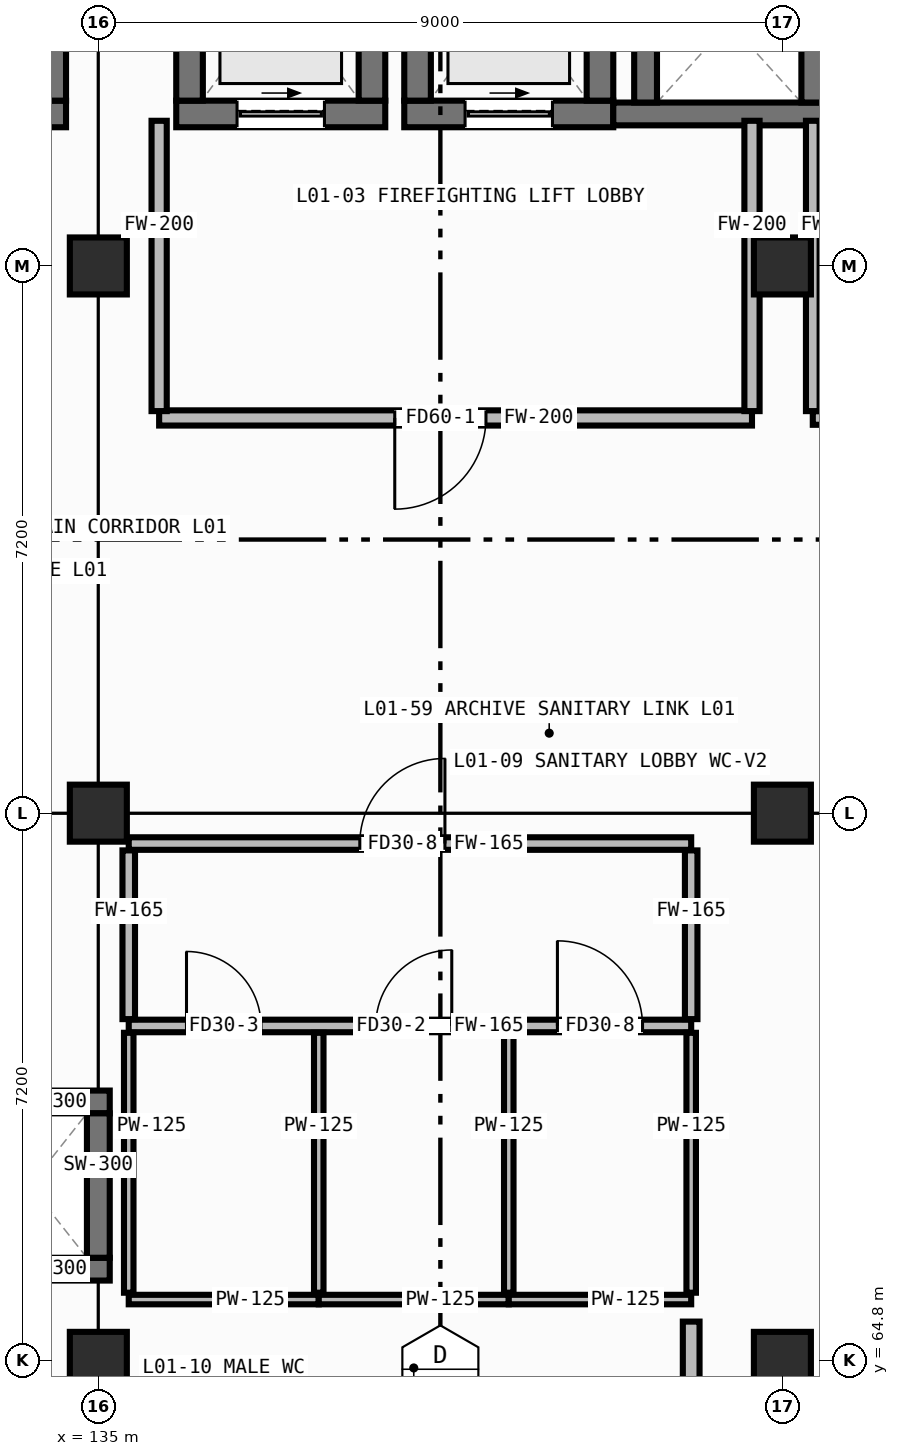
"""IFC4 building model, lengths in metres.
Left out: names, types, materials, properties, quantities, classifications, styles, units other than length and angle.
Written with IfcOpenShell. Run it as: python <this file> out.ifc"""

import sys

from ifc_helpers import new_model, si_unit, direction, frame, frame_2d, origin, origin_2d, place, context, subcontext, project, spatial, rectangle, hollow_rectangle, extrude, element, fill, save


model = new_model("IFC4")
c1 = context("Model", 3, precision=1e-05, world=origin(), true_north=direction((0.0, 1.0)))
c2 = subcontext(c1, "Body", "Model", "MODEL_VIEW")
j1 = project(units=[si_unit("LENGTHUNIT", "METRE"), si_unit("PLANEANGLEUNIT", "RADIAN")], contexts=[c1])
p1 = place(None, origin())
s1 = spatial("IfcSite", under=j1, at=p1, CompositionType="ELEMENT")
p2 = place(p1, origin())
s2 = spatial("IfcBuilding", under=s1, at=p2, CompositionType="ELEMENT")
p3 = place(p2, origin())
s3 = spatial("IfcBuildingStorey", under=s2, at=p3, CompositionType="ELEMENT", Elevation=0.0)
for number, where, z_axis, x_axis in (
    (1, (135.0, 64.8, 0.0), (0.0, 0.0, 1.0), (1.0, 0.0, 0.0)),
    (2, (135.0, 72.0, 0.0), (0.0, 0.0, 1.0), (1.0, 0.0, 0.0)),
    (3, (135.0, 79.2, 0.0), (0.0, 0.0, 1.0), (1.0, 0.0, 0.0)),
    (4, (144.0, 64.8, 0.0), (0.0, 0.0, 1.0), (1.0, 0.0, 0.0)),
    (5, (144.0, 72.0, 0.0), (0.0, 0.0, 1.0), (1.0, 0.0, 0.0)),
    (6, (144.0, 79.2, 0.0), (0.0, 0.0, 1.0), (1.0, 0.0, 0.0)),
):
    element("IfcColumn", number, at=place(p3, frame(where, z_axis=z_axis, x_axis=x_axis)), inside=s3, PredefinedType="COLUMN", context=c2, shape_type="SweptSolid", body=[
        extrude(hollow_rectangle(XDim=0.75, YDim=0.75, WallThickness=0.032, at=origin_2d()), origin(), (0.0, 0.0, 1.0), 4.8),
    ])
p4 = place(p3, frame((126.425, 81.2, 0.0), z_axis=(0.0, 0.0, 1.0), x_axis=(1.0, 0.0, 0.0)))
e7 = element("IfcWall", 7, at=p4, inside=s3, PredefinedType="SHEAR", context=c2, shape_type="SweptSolid", body=[
    extrude(rectangle(XDim=8.15, YDim=0.35, at=frame_2d((4.075, 0.0))), origin(), (0.0, 0.0, 1.0), 4.555),
])
p5 = place(p4, frame((0.525, 0.0, 0.0)))
e8 = element("IfcOpeningElement", 8, at=p5, cuts=e7, PredefinedType="OPENING", context=c2, shape_type="SweptSolid", body=[
    extrude(rectangle(XDim=1.15, YDim=2.1, at=frame_2d((0.575, 1.05))), frame((0.0, 0.187, 0.0), z_axis=(0.0, -1.0, 0.0), x_axis=(1.0, 0.0, 0.0)), (0.0, 0.0, 1.0), 0.374),
])
p6 = place(p3, frame((134.4, 81.375, 0.0), z_axis=(0.0, 0.0, 1.0), x_axis=(0.0, 1.0, 0.0)))
e9 = element("IfcWall", 9, at=p6, inside=s3, PredefinedType="SHEAR", context=c2, shape_type="SweptSolid", body=[
    extrude(rectangle(XDim=3.55, YDim=0.35, at=frame_2d((1.775, 0.0))), origin(), (0.0, 0.0, 1.0), 4.555),
])
p7 = place(p3, frame((136.025, 81.2, 0.0), z_axis=(0.0, 0.0, 1.0), x_axis=(1.0, 0.0, 0.0)))
e10 = element("IfcWall", 10, at=p7, inside=s3, PredefinedType="SHEAR", context=c2, shape_type="SweptSolid", body=[
    extrude(rectangle(XDim=2.75, YDim=0.35, at=frame_2d((1.375, 0.0))), origin(), (0.0, 0.0, 1.0), 4.555),
])
p8 = place(p7, frame((0.8, 0.0, 0.0)))
e11 = element("IfcOpeningElement", 11, at=p8, cuts=e10, PredefinedType="OPENING", context=c2, shape_type="SweptSolid", body=[
    extrude(rectangle(XDim=1.15, YDim=2.12, at=frame_2d((0.575, 1.06))), frame((0.0, 0.187, 0.0), z_axis=(0.0, -1.0, 0.0), x_axis=(1.0, 0.0, 0.0)), (0.0, 0.0, 1.0), 0.374),
])
for number, where, z_axis, x_axis in (
    (12, (136.2, 81.375, 0.0), (0.0, 0.0, 1.0), (0.0, 1.0, 0.0)),
    (13, (138.6, 81.375, 0.0), (0.0, 0.0, 1.0), (0.0, 1.0, 0.0)),
):
    element("IfcWall", number, at=place(p3, frame(where, z_axis=z_axis, x_axis=x_axis)), inside=s3, PredefinedType="SHEAR", context=c2, shape_type="SweptSolid", body=[
        extrude(rectangle(XDim=2.85, YDim=0.35, at=frame_2d((1.425, 0.0))), origin(), (0.0, 0.0, 1.0), 4.555),
    ])
p9 = place(p3, frame((139.025, 81.2, 0.0), z_axis=(0.0, 0.0, 1.0), x_axis=(1.0, 0.0, 0.0)))
e14 = element("IfcWall", 14, at=p9, inside=s3, PredefinedType="SHEAR", context=c2, shape_type="SweptSolid", body=[
    extrude(rectangle(XDim=2.75, YDim=0.35, at=frame_2d((1.375, 0.0))), origin(), (0.0, 0.0, 1.0), 4.555),
])
p10 = place(p9, frame((0.8, 0.0, 0.0)))
e15 = element("IfcOpeningElement", 15, at=p10, cuts=e14, PredefinedType="OPENING", context=c2, shape_type="SweptSolid", body=[
    extrude(rectangle(XDim=1.15, YDim=2.12, at=frame_2d((0.575, 1.06))), frame((0.0, 0.187, 0.0), z_axis=(0.0, -1.0, 0.0), x_axis=(1.0, 0.0, 0.0)), (0.0, 0.0, 1.0), 0.374),
])
for number, where, z_axis, x_axis in (
    (16, (139.2, 81.375, 0.0), (0.0, 0.0, 1.0), (0.0, 1.0, 0.0)),
    (17, (141.6, 81.375, 0.0), (0.0, 0.0, 1.0), (0.0, 1.0, 0.0)),
):
    element("IfcWall", number, at=place(p3, frame(where, z_axis=z_axis, x_axis=x_axis)), inside=s3, PredefinedType="SHEAR", context=c2, shape_type="SweptSolid", body=[
        extrude(rectangle(XDim=2.85, YDim=0.35, at=frame_2d((1.425, 0.0))), origin(), (0.0, 0.0, 1.0), 4.555),
    ])
p11 = place(p3, frame((141.775, 81.2, 0.0), z_axis=(0.0, 0.0, 1.0), x_axis=(1.0, 0.0, 0.0)))
e18 = element("IfcWall", 18, at=p11, inside=s3, PredefinedType="SHEAR", context=c2, shape_type="SweptSolid", body=[
    extrude(rectangle(XDim=3.25, YDim=0.3, at=frame_2d((1.625, 0.0))), origin(), (0.0, 0.0, 1.0), 4.555),
])
for number, where, z_axis, x_axis in (
    (19, (142.2, 81.35, 0.0), (0.0, 0.0, 1.0), (0.0, 1.0, 0.0)),
    (20, (144.4, 81.35, 0.0), (0.0, 0.0, 1.0), (0.0, 1.0, 0.0)),
    (21, (133.05, 66.0, 0.0), (0.0, 0.0, 1.0), (1.0, 0.0, 0.0)),
    (22, (133.05, 68.2, 0.0), (0.0, 0.0, 1.0), (1.0, 0.0, 0.0)),
):
    element("IfcWall", number, at=place(p3, frame(where, z_axis=z_axis, x_axis=x_axis)), inside=s3, PredefinedType="SHEAR", context=c2, shape_type="SweptSolid", body=[
        extrude(rectangle(XDim=2.1, YDim=0.3, at=frame_2d((1.05, 0.0))), origin(), (0.0, 0.0, 1.0), 4.555),
    ])
p12 = place(p3, frame((135.0, 66.15, 0.0), z_axis=(0.0, 0.0, 1.0), x_axis=(0.0, 1.0, 0.0)))
e23 = element("IfcWall", 23, at=p12, inside=s3, PredefinedType="SHEAR", context=c2, shape_type="SweptSolid", body=[
    extrude(rectangle(XDim=1.9, YDim=0.3, at=frame_2d((0.95, 0.0))), origin(), (0.0, 0.0, 1.0), 4.555),
])
p13 = place(p3, frame((135.8, 77.2, 0.0), z_axis=(0.0, 0.0, 1.0), x_axis=(1.0, 0.0, 0.0)))
e24 = element("IfcWall", 24, at=p13, inside=s3, PredefinedType="PARTITIONING", context=c2, shape_type="SweptSolid", body=[
    extrude(rectangle(XDim=7.8, YDim=0.2, at=frame_2d((3.9, 0.0))), origin(), (0.0, 0.0, 1.0), 4.555),
])
p14 = place(p13, frame((3.1, 0.0, 0.0)))
e25 = element("IfcOpeningElement", 25, at=p14, cuts=e24, PredefinedType="OPENING", context=c2, shape_type="SweptSolid", body=[
    extrude(rectangle(XDim=1.2, YDim=2.1, at=frame_2d((0.6, 1.05))), frame((0.0, 0.112, 0.0), z_axis=(0.0, -1.0, 0.0), x_axis=(1.0, 0.0, 0.0)), (0.0, 0.0, 1.0), 0.224),
])
for number, where, z_axis, x_axis in (
    (26, (135.8, 77.29, 0.0), (0.0, 0.0, 1.0), (0.0, 1.0, 0.0)),
    (27, (143.6, 77.29, 0.0), (0.0, 0.0, 1.0), (0.0, 1.0, 0.0)),
):
    element("IfcWall", number, at=place(p3, frame(where, z_axis=z_axis, x_axis=x_axis)), inside=s3, PredefinedType="PARTITIONING", context=c2, shape_type="SweptSolid", body=[
        extrude(rectangle(XDim=3.82, YDim=0.2, at=frame_2d((1.91, 0.0))), origin(), (0.0, 0.0, 1.0), 4.555),
    ])
p15 = place(p3, frame((144.4, 77.2, 0.0), z_axis=(0.0, 0.0, 1.0), x_axis=(1.0, 0.0, 0.0)))
e28 = element("IfcWall", 28, at=p15, inside=s3, PredefinedType="PARTITIONING", context=c2, shape_type="SweptSolid", body=[
    extrude(rectangle(XDim=8.2, YDim=0.18, at=frame_2d((4.1, 0.0))), origin(), (0.0, 0.0, 1.0), 4.555),
])
p16 = place(p15, frame((3.54, 0.0, 0.0)))
e29 = element("IfcOpeningElement", 29, at=p16, cuts=e28, PredefinedType="OPENING", context=c2, shape_type="SweptSolid", body=[
    extrude(rectangle(XDim=1.12, YDim=2.08, at=frame_2d((0.56, 1.04))), frame((0.0, 0.102, 0.0), z_axis=(0.0, -1.0, 0.0), x_axis=(1.0, 0.0, 0.0)), (0.0, 0.0, 1.0), 0.204),
])
p17 = place(p3, frame((144.4, 77.29, 0.0), z_axis=(0.0, 0.0, 1.0), x_axis=(0.0, 1.0, 0.0)))
e30 = element("IfcWall", 30, at=p17, inside=s3, PredefinedType="PARTITIONING", context=c2, shape_type="SweptSolid", body=[
    extrude(rectangle(XDim=3.82, YDim=0.18, at=frame_2d((1.91, 0.0))), origin(), (0.0, 0.0, 1.0), 4.555),
])
p18 = place(p3, frame((135.4, 69.2, 0.0), z_axis=(0.0, 0.0, 1.0), x_axis=(1.0, 0.0, 0.0)))
e31 = element("IfcWall", 31, at=p18, inside=s3, PredefinedType="PARTITIONING", context=c2, shape_type="SweptSolid", body=[
    extrude(rectangle(XDim=7.4, YDim=0.165, at=frame_2d((3.7, 0.0))), origin(), (0.0, 0.0, 1.0), 4.555),
])
p19 = place(p18, frame((0.76, 0.0, 0.0)))
e32 = element("IfcOpeningElement", 32, at=p19, cuts=e31, PredefinedType="OPENING", context=c2, shape_type="SweptSolid", body=[
    extrude(rectangle(XDim=0.98, YDim=2.02, at=frame_2d((0.49, 1.01))), frame((0.0, 0.094, 0.0), z_axis=(0.0, -1.0, 0.0), x_axis=(1.0, 0.0, 0.0)), (0.0, 0.0, 1.0), 0.189),
])
p20 = place(p18, frame((3.25, 0.0, 0.0)))
e33 = element("IfcOpeningElement", 33, at=p20, cuts=e31, PredefinedType="OPENING", context=c2, shape_type="SweptSolid", body=[
    extrude(rectangle(XDim=1.0, YDim=2.08, at=frame_2d((0.5, 1.04))), frame((0.0, 0.094, 0.0), z_axis=(0.0, -1.0, 0.0), x_axis=(1.0, 0.0, 0.0)), (0.0, 0.0, 1.0), 0.189),
])
p21 = place(p18, frame((5.64, 0.0, 0.0)))
e34 = element("IfcOpeningElement", 34, at=p21, cuts=e31, PredefinedType="OPENING", context=c2, shape_type="SweptSolid", body=[
    extrude(rectangle(XDim=1.12, YDim=2.08, at=frame_2d((0.56, 1.04))), frame((0.0, 0.094, 0.0), z_axis=(0.0, -1.0, 0.0), x_axis=(1.0, 0.0, 0.0)), (0.0, 0.0, 1.0), 0.189),
])
p22 = place(p3, frame((135.4, 71.6, 0.0), z_axis=(0.0, 0.0, 1.0), x_axis=(1.0, 0.0, 0.0)))
e35 = element("IfcWall", 35, at=p22, inside=s3, PredefinedType="PARTITIONING", context=c2, shape_type="SweptSolid", body=[
    extrude(rectangle(XDim=7.4, YDim=0.165, at=frame_2d((3.7, 0.0))), origin(), (0.0, 0.0, 1.0), 4.555),
])
p23 = place(p22, frame((3.04, 0.0, 0.0)))
e36 = element("IfcOpeningElement", 36, at=p23, cuts=e35, PredefinedType="OPENING", context=c2, shape_type="SweptSolid", body=[
    extrude(rectangle(XDim=1.12, YDim=2.08, at=frame_2d((0.56, 1.04))), frame((0.0, 0.094, 0.0), z_axis=(0.0, -1.0, 0.0), x_axis=(1.0, 0.0, 0.0)), (0.0, 0.0, 1.0), 0.189),
])
for number, where, z_axis, x_axis in (
    (37, (135.4, 69.29, 0.0), (0.0, 0.0, 1.0), (0.0, 1.0, 0.0)),
    (38, (142.8, 69.29, 0.0), (0.0, 0.0, 1.0), (0.0, 1.0, 0.0)),
):
    element("IfcWall", number, at=place(p3, frame(where, z_axis=z_axis, x_axis=x_axis)), inside=s3, PredefinedType="PARTITIONING", context=c2, shape_type="SweptSolid", body=[
        extrude(rectangle(XDim=2.22, YDim=0.165, at=frame_2d((1.11, 0.0))), origin(), (0.0, 0.0, 1.0), 4.555),
    ])
p24 = place(p3, frame((135.4, 65.6, 0.0), z_axis=(0.0, 0.0, 1.0), x_axis=(1.0, 0.0, 0.0)))
e39 = element("IfcWall", 39, at=p24, inside=s3, PredefinedType="PARTITIONING", context=c2, shape_type="SweptSolid", body=[
    extrude(rectangle(XDim=2.5, YDim=0.125, at=frame_2d((1.25, 0.0))), origin(), (0.0, 0.0, 1.0), 4.555),
])
for number, where, z_axis, x_axis in (
    (40, (135.4, 65.69, 0.0), (0.0, 0.0, 1.0), (0.0, 1.0, 0.0)),
    (41, (137.9, 65.69, 0.0), (0.0, 0.0, 1.0), (0.0, 1.0, 0.0)),
):
    element("IfcWall", number, at=place(p3, frame(where, z_axis=z_axis, x_axis=x_axis)), inside=s3, PredefinedType="PARTITIONING", context=c2, shape_type="SweptSolid", body=[
        extrude(rectangle(XDim=3.42, YDim=0.125, at=frame_2d((1.71, 0.0))), origin(), (0.0, 0.0, 1.0), 4.555),
    ])
p25 = place(p3, frame((137.9, 65.6, 0.0), z_axis=(0.0, 0.0, 1.0), x_axis=(1.0, 0.0, 0.0)))
e42 = element("IfcWall", 42, at=p25, inside=s3, PredefinedType="PARTITIONING", context=c2, shape_type="SweptSolid", body=[
    extrude(rectangle(XDim=2.5, YDim=0.125, at=frame_2d((1.25, 0.0))), origin(), (0.0, 0.0, 1.0), 4.555),
])
p26 = place(p3, frame((140.4, 65.69, 0.0), z_axis=(0.0, 0.0, 1.0), x_axis=(0.0, 1.0, 0.0)))
e43 = element("IfcWall", 43, at=p26, inside=s3, PredefinedType="PARTITIONING", context=c2, shape_type="SweptSolid", body=[
    extrude(rectangle(XDim=3.42, YDim=0.125, at=frame_2d((1.71, 0.0))), origin(), (0.0, 0.0, 1.0), 4.555),
])
p27 = place(p3, frame((140.4, 65.6, 0.0), z_axis=(0.0, 0.0, 1.0), x_axis=(1.0, 0.0, 0.0)))
e44 = element("IfcWall", 44, at=p27, inside=s3, PredefinedType="PARTITIONING", context=c2, shape_type="SweptSolid", body=[
    extrude(rectangle(XDim=2.4, YDim=0.125, at=frame_2d((1.2, 0.0))), origin(), (0.0, 0.0, 1.0), 4.555),
])
p28 = place(p3, frame((142.8, 65.69, 0.0), z_axis=(0.0, 0.0, 1.0), x_axis=(0.0, 1.0, 0.0)))
e45 = element("IfcWall", 45, at=p28, inside=s3, PredefinedType="PARTITIONING", context=c2, shape_type="SweptSolid", body=[
    extrude(rectangle(XDim=3.42, YDim=0.125, at=frame_2d((1.71, 0.0))), origin(), (0.0, 0.0, 1.0), 4.555),
])
p29 = place(p3, frame((142.8, 43.38, 0.0), z_axis=(0.0, 0.0, 1.0), x_axis=(0.0, 1.0, 0.0)))
e46 = element("IfcWall", 46, at=p29, inside=s3, PredefinedType="PARTITIONING", context=c2, shape_type="SweptSolid", body=[
    extrude(rectangle(XDim=21.93, YDim=0.22, at=frame_2d((10.965, 0.0))), origin(), (0.0, 0.0, 1.0), 4.555),
])
p30 = place(p29, frame((9.945, 0.0, 0.0)))
e47 = element("IfcOpeningElement", 47, at=p30, cuts=e46, PredefinedType="OPENING", context=c2, shape_type="SweptSolid", body=[
    extrude(rectangle(XDim=1.35, YDim=2.08, at=frame_2d((0.675, 1.04))), frame((0.0, 0.122, 0.0), z_axis=(0.0, -1.0, 0.0), x_axis=(1.0, 0.0, 0.0)), (0.0, 0.0, 1.0), 0.244),
])
p31 = place(p8, origin())
e48 = element("IfcDoor", 48, at=p31, inside=s3, OperationType="SLIDING_TO_LEFT", PredefinedType="DOOR", context=c2, shape_type="SweptSolid", body=[
    extrude(rectangle(XDim=1.15, YDim=2.12, at=frame_2d((0.575, 1.06))), frame((0.0, 0.025, 0.0), z_axis=(0.0, -1.0, 0.0), x_axis=(1.0, 0.0, 0.0)), (0.0, 0.0, 1.0), 0.05),
])
fill(e11, e48)
p32 = place(p10, origin())
e49 = element("IfcDoor", 49, at=p32, inside=s3, OperationType="SLIDING_TO_LEFT", PredefinedType="DOOR", context=c2, shape_type="SweptSolid", body=[
    extrude(rectangle(XDim=1.15, YDim=2.12, at=frame_2d((0.575, 1.06))), frame((0.0, 0.025, 0.0), z_axis=(0.0, -1.0, 0.0), x_axis=(1.0, 0.0, 0.0)), (0.0, 0.0, 1.0), 0.05),
])
fill(e15, e49)
p33 = place(p14, frame((1.2, 0.0, 0.0), z_axis=(0.0, 0.0, 1.0), x_axis=(-1.0, 0.0, 0.0)))
e50 = element("IfcDoor", 50, at=p33, inside=s3, OperationType="SINGLE_SWING_RIGHT", PredefinedType="DOOR", context=c2, shape_type="SweptSolid", body=[
    extrude(rectangle(XDim=1.2, YDim=2.1, at=frame_2d((0.6, 1.05))), frame((0.0, 0.025, 0.0), z_axis=(0.0, -1.0, 0.0), x_axis=(1.0, 0.0, 0.0)), (0.0, 0.0, 1.0), 0.05),
])
fill(e25, e50)
p34 = place(p23, origin())
e51 = element("IfcDoor", 51, at=p34, inside=s3, OperationType="SINGLE_SWING_RIGHT", PredefinedType="DOOR", context=c2, shape_type="SweptSolid", body=[
    extrude(rectangle(XDim=1.12, YDim=2.08, at=frame_2d((0.56, 1.04))), frame((0.0, 0.025, 0.0), z_axis=(0.0, -1.0, 0.0), x_axis=(1.0, 0.0, 0.0)), (0.0, 0.0, 1.0), 0.05),
])
fill(e36, e51)
p35 = place(p19, origin())
e52 = element("IfcDoor", 52, at=p35, inside=s3, OperationType="SINGLE_SWING_LEFT", PredefinedType="DOOR", context=c2, shape_type="SweptSolid", body=[
    extrude(rectangle(XDim=0.98, YDim=2.02, at=frame_2d((0.49, 1.01))), frame((0.0, 0.025, 0.0), z_axis=(0.0, -1.0, 0.0), x_axis=(1.0, 0.0, 0.0)), (0.0, 0.0, 1.0), 0.05),
])
fill(e32, e52)
p36 = place(p20, origin())
e53 = element("IfcDoor", 53, at=p36, inside=s3, OperationType="SINGLE_SWING_RIGHT", PredefinedType="DOOR", context=c2, shape_type="SweptSolid", body=[
    extrude(rectangle(XDim=1.0, YDim=2.08, at=frame_2d((0.5, 1.04))), frame((0.0, 0.025, 0.0), z_axis=(0.0, -1.0, 0.0), x_axis=(1.0, 0.0, 0.0)), (0.0, 0.0, 1.0), 0.05),
])
fill(e33, e53)
p37 = place(p21, origin())
e54 = element("IfcDoor", 54, at=p37, inside=s3, OperationType="SINGLE_SWING_LEFT", PredefinedType="DOOR", context=c2, shape_type="SweptSolid", body=[
    extrude(rectangle(XDim=1.12, YDim=2.08, at=frame_2d((0.56, 1.04))), frame((0.0, 0.025, 0.0), z_axis=(0.0, -1.0, 0.0), x_axis=(1.0, 0.0, 0.0)), (0.0, 0.0, 1.0), 0.05),
])
fill(e34, e54)
save(model, sys.argv[1])
